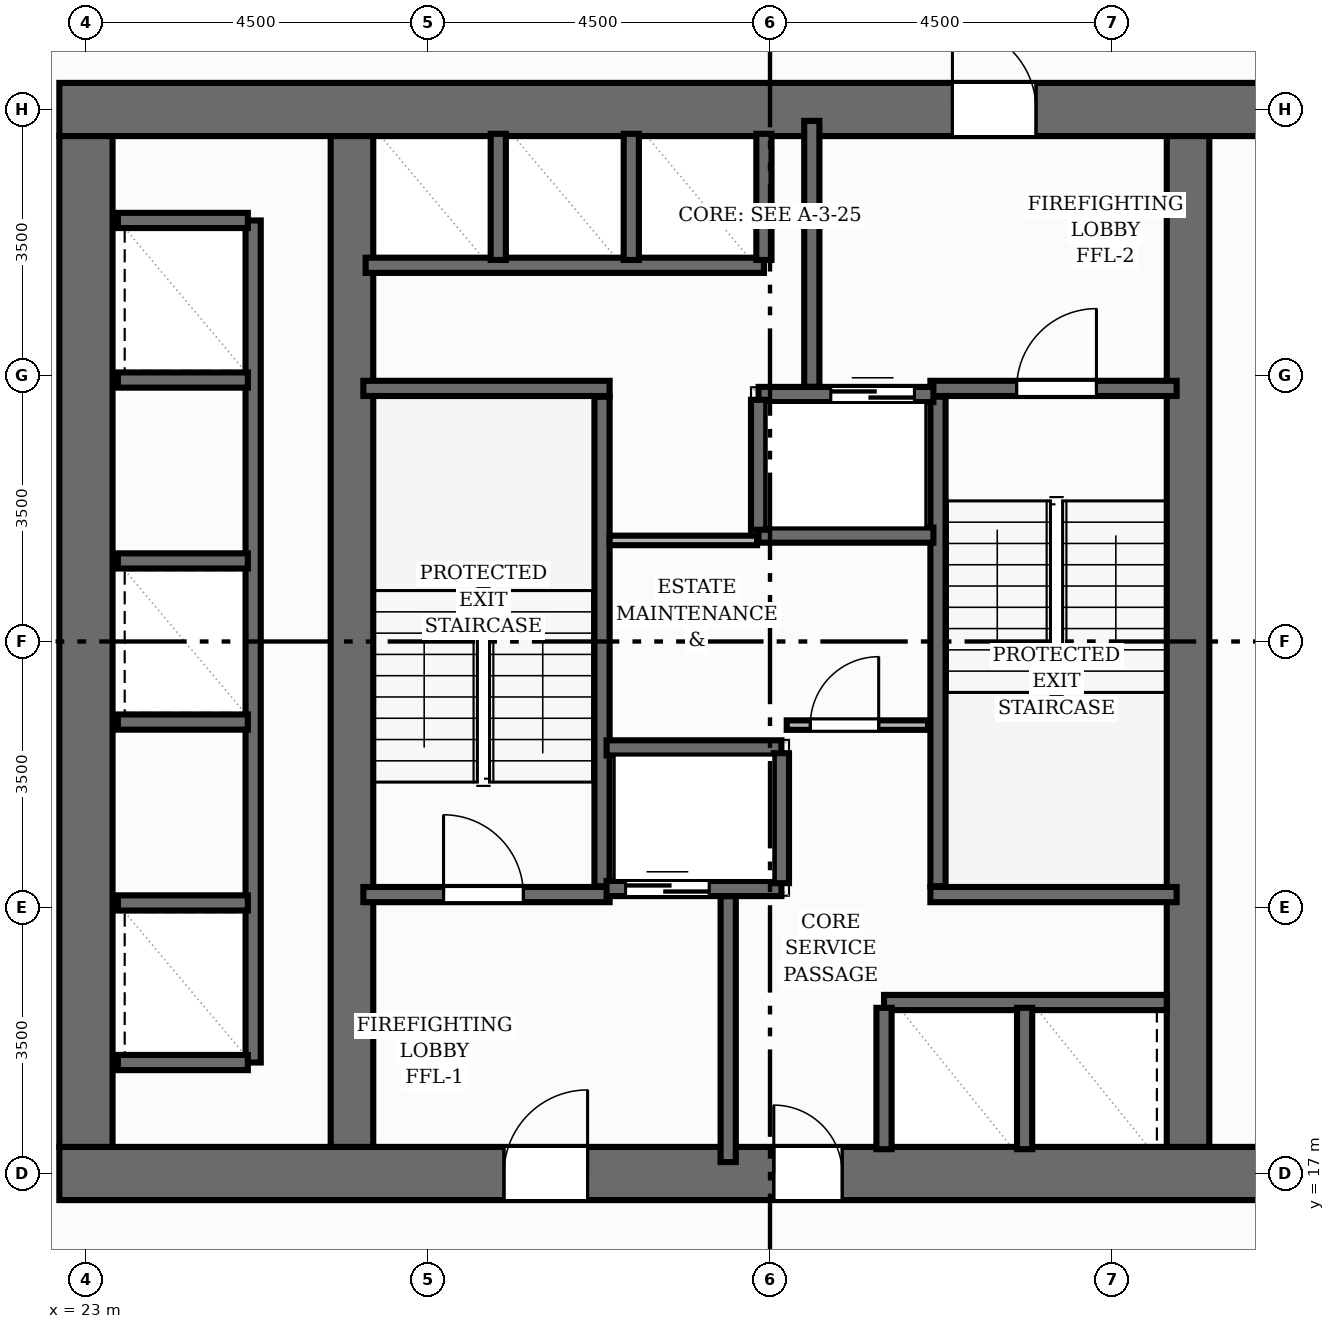
"""IFC4 building model, lengths in metres.
Left out: names, types, materials, properties, quantities, classifications, styles, units other than length and angle.
Written with IfcOpenShell. Run it as: python <this file> out.ifc"""

import sys

from ifc_helpers import new_model, si_unit, direction, frame, frame_2d, origin, place, context, subcontext, project, spatial, rectangle, extrude, element, fill, save


model = new_model("IFC4")
c1 = context("Model", 3, precision=1e-05, world=origin(), true_north=direction((0.0, 1.0)))
c2 = subcontext(c1, "Body", "Model", "MODEL_VIEW")
j1 = project(units=[si_unit("LENGTHUNIT", "METRE"), si_unit("PLANEANGLEUNIT", "RADIAN")], contexts=[c1])
p1 = place(None, origin())
s1 = spatial("IfcSite", under=j1, at=p1, CompositionType="ELEMENT")
p2 = place(p1, origin())
s2 = spatial("IfcBuilding", under=s1, at=p2, CompositionType="ELEMENT")
p3 = place(p2, frame((0.0, 0.0, 99.68)))
s3 = spatial("IfcBuildingStorey", under=s2, at=p3, CompositionType="ELEMENT", Elevation=99.68)
p4 = place(p3, frame((22.65, 17.0, 0.0), z_axis=(0.0, 0.0, 1.0), x_axis=(1.0, 0.0, 0.0)))
e1 = element("IfcWall", 1, at=p4, inside=s3, PredefinedType="SHEAR", context=c2, shape_type="SweptSolid", body=[
    extrude(rectangle(XDim=18.7, YDim=0.7, at=frame_2d((9.35, 0.0))), origin(), (0.0, 0.0, 1.0), 3.2),
])
p5 = place(p4, frame((5.85, 0.0, 0.0)))
e2 = element("IfcOpeningElement", 2, at=p5, cuts=e1, PredefinedType="OPENING", context=c2, shape_type="SweptSolid", body=[
    extrude(rectangle(XDim=1.1, YDim=2.15, at=frame_2d((0.55, 1.075))), frame((0.0, 0.36, 0.0), z_axis=(0.0, -1.0, 0.0), x_axis=(1.0, 0.0, 0.0)), (0.0, 0.0, 1.0), 0.72),
])
p6 = place(p4, frame((9.4, 0.0, 0.0)))
e3 = element("IfcOpeningElement", 3, at=p6, cuts=e1, PredefinedType="OPENING", context=c2, shape_type="SweptSolid", body=[
    extrude(rectangle(XDim=0.9, YDim=2.1, at=frame_2d((0.45, 1.05))), frame((0.0, 0.36, 0.0), z_axis=(0.0, -1.0, 0.0), x_axis=(1.0, 0.0, 0.0)), (0.0, 0.0, 1.0), 0.72),
])
p7 = place(p3, frame((22.65, 31.0, 0.0), z_axis=(0.0, 0.0, 1.0), x_axis=(1.0, 0.0, 0.0)))
e4 = element("IfcWall", 4, at=p7, inside=s3, PredefinedType="SHEAR", context=c2, shape_type="SweptSolid", body=[
    extrude(rectangle(XDim=18.7, YDim=0.7, at=frame_2d((9.35, 0.0))), origin(), (0.0, 0.0, 1.0), 3.2),
])
p8 = place(p7, frame((11.75, 0.0, 0.0)))
e5 = element("IfcOpeningElement", 5, at=p8, cuts=e4, PredefinedType="OPENING", context=c2, shape_type="SweptSolid", body=[
    extrude(rectangle(XDim=1.1, YDim=2.15, at=frame_2d((0.55, 1.075))), frame((0.0, 0.36, 0.0), z_axis=(0.0, -1.0, 0.0), x_axis=(1.0, 0.0, 0.0)), (0.0, 0.0, 1.0), 0.72),
])
p9 = place(p3, frame((23.0, 17.35, 0.0), z_axis=(0.0, 0.0, 1.0), x_axis=(0.0, 1.0, 0.0)))
e6 = element("IfcWall", 6, at=p9, inside=s3, PredefinedType="SHEAR", context=c2, shape_type="SweptSolid", body=[
    extrude(rectangle(XDim=13.3, YDim=0.7, at=frame_2d((6.65, 0.0))), origin(), (0.0, 0.0, 1.0), 3.2),
])
for number, where, z_axis, x_axis in (
    (7, (26.5, 17.35, 0.0), (0.0, 0.0, 1.0), (0.0, 1.0, 0.0)),
    (8, (37.5, 17.35, 0.0), (0.0, 0.0, 1.0), (0.0, 1.0, 0.0)),
):
    element("IfcWall", number, at=place(p3, frame(where, z_axis=z_axis, x_axis=x_axis)), inside=s3, PredefinedType="SHEAR", context=c2, shape_type="SweptSolid", body=[
        extrude(rectangle(XDim=13.3, YDim=0.56, at=frame_2d((6.65, 0.0))), origin(), (0.0, 0.0, 1.0), 3.2),
    ])
p10 = place(p3, frame((29.79, 20.78, 0.0), z_axis=(0.0, 0.0, 1.0), x_axis=(0.0, 1.0, 0.0)))
e9 = element("IfcWall", 9, at=p10, inside=s3, PredefinedType="SHEAR", context=c2, shape_type="SweptSolid", body=[
    extrude(rectangle(XDim=6.44, YDim=0.2, at=frame_2d((3.22, 0.0))), origin(), (0.0, 0.0, 1.0), 3.2),
])
p11 = place(p3, frame((26.65, 27.33, 0.0), z_axis=(0.0, 0.0, 1.0), x_axis=(1.0, 0.0, 0.0)))
e10 = element("IfcWall", 10, at=p11, inside=s3, PredefinedType="SHEAR", context=c2, shape_type="SweptSolid", body=[
    extrude(rectangle(XDim=3.24, YDim=0.2, at=frame_2d((1.62, 0.0))), origin(), (0.0, 0.0, 1.0), 3.2),
])
p12 = place(p3, frame((26.65, 20.67, 0.0), z_axis=(0.0, 0.0, 1.0), x_axis=(1.0, 0.0, 0.0)))
e11 = element("IfcWall", 11, at=p12, inside=s3, PredefinedType="SHEAR", context=c2, shape_type="SweptSolid", body=[
    extrude(rectangle(XDim=3.24, YDim=0.2, at=frame_2d((1.62, 0.0))), origin(), (0.0, 0.0, 1.0), 3.2),
])
p13 = place(p12, frame((1.055, 0.0, 0.0)))
e12 = element("IfcOpeningElement", 12, at=p13, cuts=e11, PredefinedType="OPENING", context=c2, shape_type="SweptSolid", body=[
    extrude(rectangle(XDim=1.05, YDim=2.15, at=frame_2d((0.525, 1.075))), frame((0.0, 0.11, 0.0), z_axis=(0.0, -1.0, 0.0), x_axis=(1.0, 0.0, 0.0)), (0.0, 0.0, 1.0), 0.22),
])
p14 = place(p3, frame((34.21, 20.78, 0.0), z_axis=(0.0, 0.0, 1.0), x_axis=(0.0, 1.0, 0.0)))
e13 = element("IfcWall", 13, at=p14, inside=s3, PredefinedType="SHEAR", context=c2, shape_type="SweptSolid", body=[
    extrude(rectangle(XDim=6.44, YDim=0.2, at=frame_2d((3.22, 0.0))), origin(), (0.0, 0.0, 1.0), 3.2),
])
p15 = place(p3, frame((34.11, 20.67, 0.0), z_axis=(0.0, 0.0, 1.0), x_axis=(1.0, 0.0, 0.0)))
e14 = element("IfcWall", 14, at=p15, inside=s3, PredefinedType="SHEAR", context=c2, shape_type="SweptSolid", body=[
    extrude(rectangle(XDim=3.24, YDim=0.2, at=frame_2d((1.62, 0.0))), origin(), (0.0, 0.0, 1.0), 3.2),
])
p16 = place(p3, frame((34.11, 27.33, 0.0), z_axis=(0.0, 0.0, 1.0), x_axis=(1.0, 0.0, 0.0)))
e15 = element("IfcWall", 15, at=p16, inside=s3, PredefinedType="SHEAR", context=c2, shape_type="SweptSolid", body=[
    extrude(rectangle(XDim=3.24, YDim=0.2, at=frame_2d((1.62, 0.0))), origin(), (0.0, 0.0, 1.0), 3.2),
])
p17 = place(p16, frame((1.135, 0.0, 0.0)))
e16 = element("IfcOpeningElement", 16, at=p17, cuts=e15, PredefinedType="OPENING", context=c2, shape_type="SweptSolid", body=[
    extrude(rectangle(XDim=1.05, YDim=2.15, at=frame_2d((0.525, 1.075))), frame((0.0, 0.11, 0.0), z_axis=(0.0, -1.0, 0.0), x_axis=(1.0, 0.0, 0.0)), (0.0, 0.0, 1.0), 0.22),
])
for number, where, z_axis, x_axis in (
    (17, (31.45, 17.15, 0.0), (0.0, 0.0, 1.0), (0.0, 1.0, 0.0)),
    (18, (32.55, 27.35, 0.0), (0.0, 0.0, 1.0), (0.0, 1.0, 0.0)),
):
    element("IfcWall", number, at=place(p3, frame(where, z_axis=z_axis, x_axis=x_axis)), inside=s3, PredefinedType="SHEAR", context=c2, shape_type="SweptSolid", body=[
        extrude(rectangle(XDim=3.5, YDim=0.2, at=frame_2d((1.75, 0.0))), origin(), (0.0, 0.0, 1.0), 3.2),
    ])
p18 = place(p3, frame((29.85, 20.75, 0.0), z_axis=(0.0, 0.0, 1.0), x_axis=(1.0, 0.0, 0.0)))
e19 = element("IfcWall", 19, at=p18, inside=s3, PredefinedType="SHEAR", context=c2, shape_type="SweptSolid", body=[
    extrude(rectangle(XDim=2.3, YDim=0.2, at=frame_2d((1.15, 0.0))), origin(), (0.0, 0.0, 1.0), 3.2),
])
p19 = place(p18, frame((0.25, 0.0, 0.0)))
e20 = element("IfcOpeningElement", 20, at=p19, cuts=e19, PredefinedType="OPENING", context=c2, shape_type="SweptSolid", body=[
    extrude(rectangle(XDim=1.1, YDim=2.15, at=frame_2d((0.55, 1.075))), frame((0.0, 0.11, 0.0), z_axis=(0.0, -1.0, 0.0), x_axis=(1.0, 0.0, 0.0)), (0.0, 0.0, 1.0), 0.22),
])
p20 = place(p3, frame((29.85, 22.6, 0.0), z_axis=(0.0, 0.0, 1.0), x_axis=(1.0, 0.0, 0.0)))
e21 = element("IfcWall", 21, at=p20, inside=s3, PredefinedType="SHEAR", context=c2, shape_type="SweptSolid", body=[
    extrude(rectangle(XDim=2.3, YDim=0.2, at=frame_2d((1.15, 0.0))), origin(), (0.0, 0.0, 1.0), 3.2),
])
p21 = place(p3, frame((32.15, 20.82, 0.0), z_axis=(0.0, 0.0, 1.0), x_axis=(0.0, 1.0, 0.0)))
e22 = element("IfcWall", 22, at=p21, inside=s3, PredefinedType="SHEAR", context=c2, shape_type="SweptSolid", body=[
    extrude(rectangle(XDim=1.71, YDim=0.2, at=frame_2d((0.855, 0.0))), origin(), (0.0, 0.0, 1.0), 3.2),
])
p22 = place(p3, frame((31.85, 27.25, 0.0), z_axis=(0.0, 0.0, 1.0), x_axis=(1.0, 0.0, 0.0)))
e23 = element("IfcWall", 23, at=p22, inside=s3, PredefinedType="SHEAR", context=c2, shape_type="SweptSolid", body=[
    extrude(rectangle(XDim=2.3, YDim=0.2, at=frame_2d((1.15, 0.0))), origin(), (0.0, 0.0, 1.0), 3.2),
])
p23 = place(p22, frame((0.95, 0.0, 0.0)))
e24 = element("IfcOpeningElement", 24, at=p23, cuts=e23, PredefinedType="OPENING", context=c2, shape_type="SweptSolid", body=[
    extrude(rectangle(XDim=1.1, YDim=2.15, at=frame_2d((0.55, 1.075))), frame((0.0, 0.11, 0.0), z_axis=(0.0, -1.0, 0.0), x_axis=(1.0, 0.0, 0.0)), (0.0, 0.0, 1.0), 0.22),
])
p24 = place(p3, frame((31.85, 25.4, 0.0), z_axis=(0.0, 0.0, 1.0), x_axis=(1.0, 0.0, 0.0)))
e25 = element("IfcWall", 25, at=p24, inside=s3, PredefinedType="SHEAR", context=c2, shape_type="SweptSolid", body=[
    extrude(rectangle(XDim=2.3, YDim=0.2, at=frame_2d((1.15, 0.0))), origin(), (0.0, 0.0, 1.0), 3.2),
])
p25 = place(p3, frame((31.85, 25.47, 0.0), z_axis=(0.0, 0.0, 1.0), x_axis=(0.0, 1.0, 0.0)))
e26 = element("IfcWall", 26, at=p25, inside=s3, PredefinedType="SHEAR", context=c2, shape_type="SweptSolid", body=[
    extrude(rectangle(XDim=1.71, YDim=0.2, at=frame_2d((0.855, 0.0))), origin(), (0.0, 0.0, 1.0), 3.2),
])
p26 = place(p3, frame((25.2, 18.46, 0.0), z_axis=(0.0, 0.0, 1.0), x_axis=(0.0, 1.0, 0.0)))
e27 = element("IfcWall", 27, at=p26, inside=s3, PredefinedType="SHEAR", context=c2, shape_type="SweptSolid", body=[
    extrude(rectangle(XDim=11.08, YDim=0.2, at=frame_2d((5.54, 0.0))), origin(), (0.0, 0.0, 1.0), 3.2),
])
for number, where, z_axis, x_axis in (
    (28, (23.42, 18.46, 0.0), (0.0, 0.0, 1.0), (1.0, 0.0, 0.0)),
    (29, (23.42, 29.54, 0.0), (0.0, 0.0, 1.0), (1.0, 0.0, 0.0)),
    (30, (23.42, 20.56, 0.0), (0.0, 0.0, 1.0), (1.0, 0.0, 0.0)),
    (31, (23.42, 22.94, 0.0), (0.0, 0.0, 1.0), (1.0, 0.0, 0.0)),
    (32, (23.42, 25.06, 0.0), (0.0, 0.0, 1.0), (1.0, 0.0, 0.0)),
    (33, (23.42, 27.44, 0.0), (0.0, 0.0, 1.0), (1.0, 0.0, 0.0)),
):
    element("IfcWall", number, at=place(p3, frame(where, z_axis=z_axis, x_axis=x_axis)), inside=s3, PredefinedType="SHEAR", context=c2, shape_type="SweptSolid", body=[
        extrude(rectangle(XDim=1.71, YDim=0.2, at=frame_2d((0.855, 0.0))), origin(), (0.0, 0.0, 1.0), 3.2),
    ])
p27 = place(p3, frame((26.68, 28.95, 0.0), z_axis=(0.0, 0.0, 1.0), x_axis=(1.0, 0.0, 0.0)))
e34 = element("IfcWall", 34, at=p27, inside=s3, PredefinedType="SHEAR", context=c2, shape_type="SweptSolid", body=[
    extrude(rectangle(XDim=5.24, YDim=0.2, at=frame_2d((2.62, 0.0))), origin(), (0.0, 0.0, 1.0), 3.2),
])
for number, where, z_axis, x_axis in (
    (35, (31.92, 29.02, 0.0), (0.0, 0.0, 1.0), (0.0, 1.0, 0.0)),
    (36, (28.425, 29.02, 0.0), (0.0, 0.0, 1.0), (0.0, 1.0, 0.0)),
    (37, (30.175, 29.02, 0.0), (0.0, 0.0, 1.0), (0.0, 1.0, 0.0)),
):
    element("IfcWall", number, at=place(p3, frame(where, z_axis=z_axis, x_axis=x_axis)), inside=s3, PredefinedType="SHEAR", context=c2, shape_type="SweptSolid", body=[
        extrude(rectangle(XDim=1.66, YDim=0.2, at=frame_2d((0.83, 0.0))), origin(), (0.0, 0.0, 1.0), 3.2),
    ])
p28 = place(p3, frame((33.5, 19.25, 0.0), z_axis=(0.0, 0.0, 1.0), x_axis=(1.0, 0.0, 0.0)))
e38 = element("IfcWall", 38, at=p28, inside=s3, PredefinedType="SHEAR", context=c2, shape_type="SweptSolid", body=[
    extrude(rectangle(XDim=3.72, YDim=0.2, at=frame_2d((1.86, 0.0))), origin(), (0.0, 0.0, 1.0), 3.2),
])
for number, where, z_axis, x_axis in (
    (39, (33.5, 17.32, 0.0), (0.0, 0.0, 1.0), (0.0, 1.0, 0.0)),
    (40, (35.35, 17.32, 0.0), (0.0, 0.0, 1.0), (0.0, 1.0, 0.0)),
):
    element("IfcWall", number, at=place(p3, frame(where, z_axis=z_axis, x_axis=x_axis)), inside=s3, PredefinedType="SHEAR", context=c2, shape_type="SweptSolid", body=[
        extrude(rectangle(XDim=1.86, YDim=0.2, at=frame_2d((0.93, 0.0))), origin(), (0.0, 0.0, 1.0), 3.2),
    ])
p29 = place(p3, frame((32.22, 22.9, 0.0), z_axis=(0.0, 0.0, 1.0), x_axis=(1.0, 0.0, 0.0)))
e41 = element("IfcWall", 41, at=p29, inside=s3, PredefinedType="PARTITIONING", context=c2, shape_type="SweptSolid", body=[
    extrude(rectangle(XDim=1.86, YDim=0.125, at=frame_2d((0.93, 0.0))), origin(), (0.0, 0.0, 1.0), 2.955),
])
p30 = place(p29, frame((0.31, 0.0, 0.0)))
e42 = element("IfcOpeningElement", 42, at=p30, cuts=e41, PredefinedType="OPENING", context=c2, shape_type="SweptSolid", body=[
    extrude(rectangle(XDim=0.9, YDim=2.1, at=frame_2d((0.45, 1.05))), frame((0.0, 0.073, 0.0), z_axis=(0.0, -1.0, 0.0), x_axis=(1.0, 0.0, 0.0)), (0.0, 0.0, 1.0), 0.145),
])
p31 = place(p3, frame((29.89, 25.33, 0.0), z_axis=(0.0, 0.0, 1.0), x_axis=(1.0, 0.0, 0.0)))
e43 = element("IfcWall", 43, at=p31, inside=s3, PredefinedType="PARTITIONING", context=c2, shape_type="SweptSolid", body=[
    extrude(rectangle(XDim=1.94, YDim=0.125, at=frame_2d((0.97, 0.0))), origin(), (0.0, 0.0, 1.0), 2.955),
])
p32 = place(p13, origin())
e44 = element("IfcDoor", 44, at=p32, inside=s3, OperationType="SINGLE_SWING_LEFT", PredefinedType="DOOR", context=c2, shape_type="SweptSolid", body=[
    extrude(rectangle(XDim=1.05, YDim=2.15, at=frame_2d((0.525, 1.075))), frame((0.0, 0.025, 0.0), z_axis=(0.0, -1.0, 0.0), x_axis=(1.0, 0.0, 0.0)), (0.0, 0.0, 1.0), 0.05),
])
fill(e12, e44)
p33 = place(p17, origin())
e45 = element("IfcDoor", 45, at=p33, inside=s3, OperationType="SINGLE_SWING_RIGHT", PredefinedType="DOOR", context=c2, shape_type="SweptSolid", body=[
    extrude(rectangle(XDim=1.05, YDim=2.15, at=frame_2d((0.525, 1.075))), frame((0.0, 0.025, 0.0), z_axis=(0.0, -1.0, 0.0), x_axis=(1.0, 0.0, 0.0)), (0.0, 0.0, 1.0), 0.05),
])
fill(e16, e45)
p34 = place(p5, origin())
e46 = element("IfcDoor", 46, at=p34, inside=s3, OperationType="SINGLE_SWING_RIGHT", PredefinedType="DOOR", context=c2, shape_type="SweptSolid", body=[
    extrude(rectangle(XDim=1.1, YDim=2.15, at=frame_2d((0.55, 1.075))), frame((0.0, 0.025, 0.0), z_axis=(0.0, -1.0, 0.0), x_axis=(1.0, 0.0, 0.0)), (0.0, 0.0, 1.0), 0.05),
])
fill(e2, e46)
p35 = place(p8, origin())
e47 = element("IfcDoor", 47, at=p35, inside=s3, OperationType="SINGLE_SWING_LEFT", PredefinedType="DOOR", context=c2, shape_type="SweptSolid", body=[
    extrude(rectangle(XDim=1.1, YDim=2.15, at=frame_2d((0.55, 1.075))), frame((0.0, 0.025, 0.0), z_axis=(0.0, -1.0, 0.0), x_axis=(1.0, 0.0, 0.0)), (0.0, 0.0, 1.0), 0.05),
])
fill(e5, e47)
p36 = place(p19, origin())
e48 = element("IfcDoor", 48, at=p36, inside=s3, OperationType="DOUBLE_DOOR_SLIDING", PredefinedType="DOOR", context=c2, shape_type="SweptSolid", body=[
    extrude(rectangle(XDim=1.1, YDim=2.15, at=frame_2d((0.55, 1.075))), frame((0.0, 0.025, 0.0), z_axis=(0.0, -1.0, 0.0), x_axis=(1.0, 0.0, 0.0)), (0.0, 0.0, 1.0), 0.05),
])
fill(e20, e48)
p37 = place(p23, origin())
e49 = element("IfcDoor", 49, at=p37, inside=s3, OperationType="DOUBLE_DOOR_SLIDING", PredefinedType="DOOR", context=c2, shape_type="SweptSolid", body=[
    extrude(rectangle(XDim=1.1, YDim=2.15, at=frame_2d((0.55, 1.075))), frame((0.0, 0.025, 0.0), z_axis=(0.0, -1.0, 0.0), x_axis=(1.0, 0.0, 0.0)), (0.0, 0.0, 1.0), 0.05),
])
fill(e24, e49)
p38 = place(p6, origin())
e50 = element("IfcDoor", 50, at=p38, inside=s3, OperationType="SINGLE_SWING_LEFT", PredefinedType="DOOR", context=c2, shape_type="SweptSolid", body=[
    extrude(rectangle(XDim=0.9, YDim=2.1, at=frame_2d((0.45, 1.05))), frame((0.0, 0.025, 0.0), z_axis=(0.0, -1.0, 0.0), x_axis=(1.0, 0.0, 0.0)), (0.0, 0.0, 1.0), 0.05),
])
fill(e3, e50)
p39 = place(p30, origin())
e51 = element("IfcDoor", 51, at=p39, inside=s3, OperationType="SINGLE_SWING_RIGHT", PredefinedType="DOOR", context=c2, shape_type="SweptSolid", body=[
    extrude(rectangle(XDim=0.9, YDim=2.1, at=frame_2d((0.45, 1.05))), frame((0.0, 0.025, 0.0), z_axis=(0.0, -1.0, 0.0), x_axis=(1.0, 0.0, 0.0)), (0.0, 0.0, 1.0), 0.05),
])
fill(e42, e51)
save(model, sys.argv[1])
